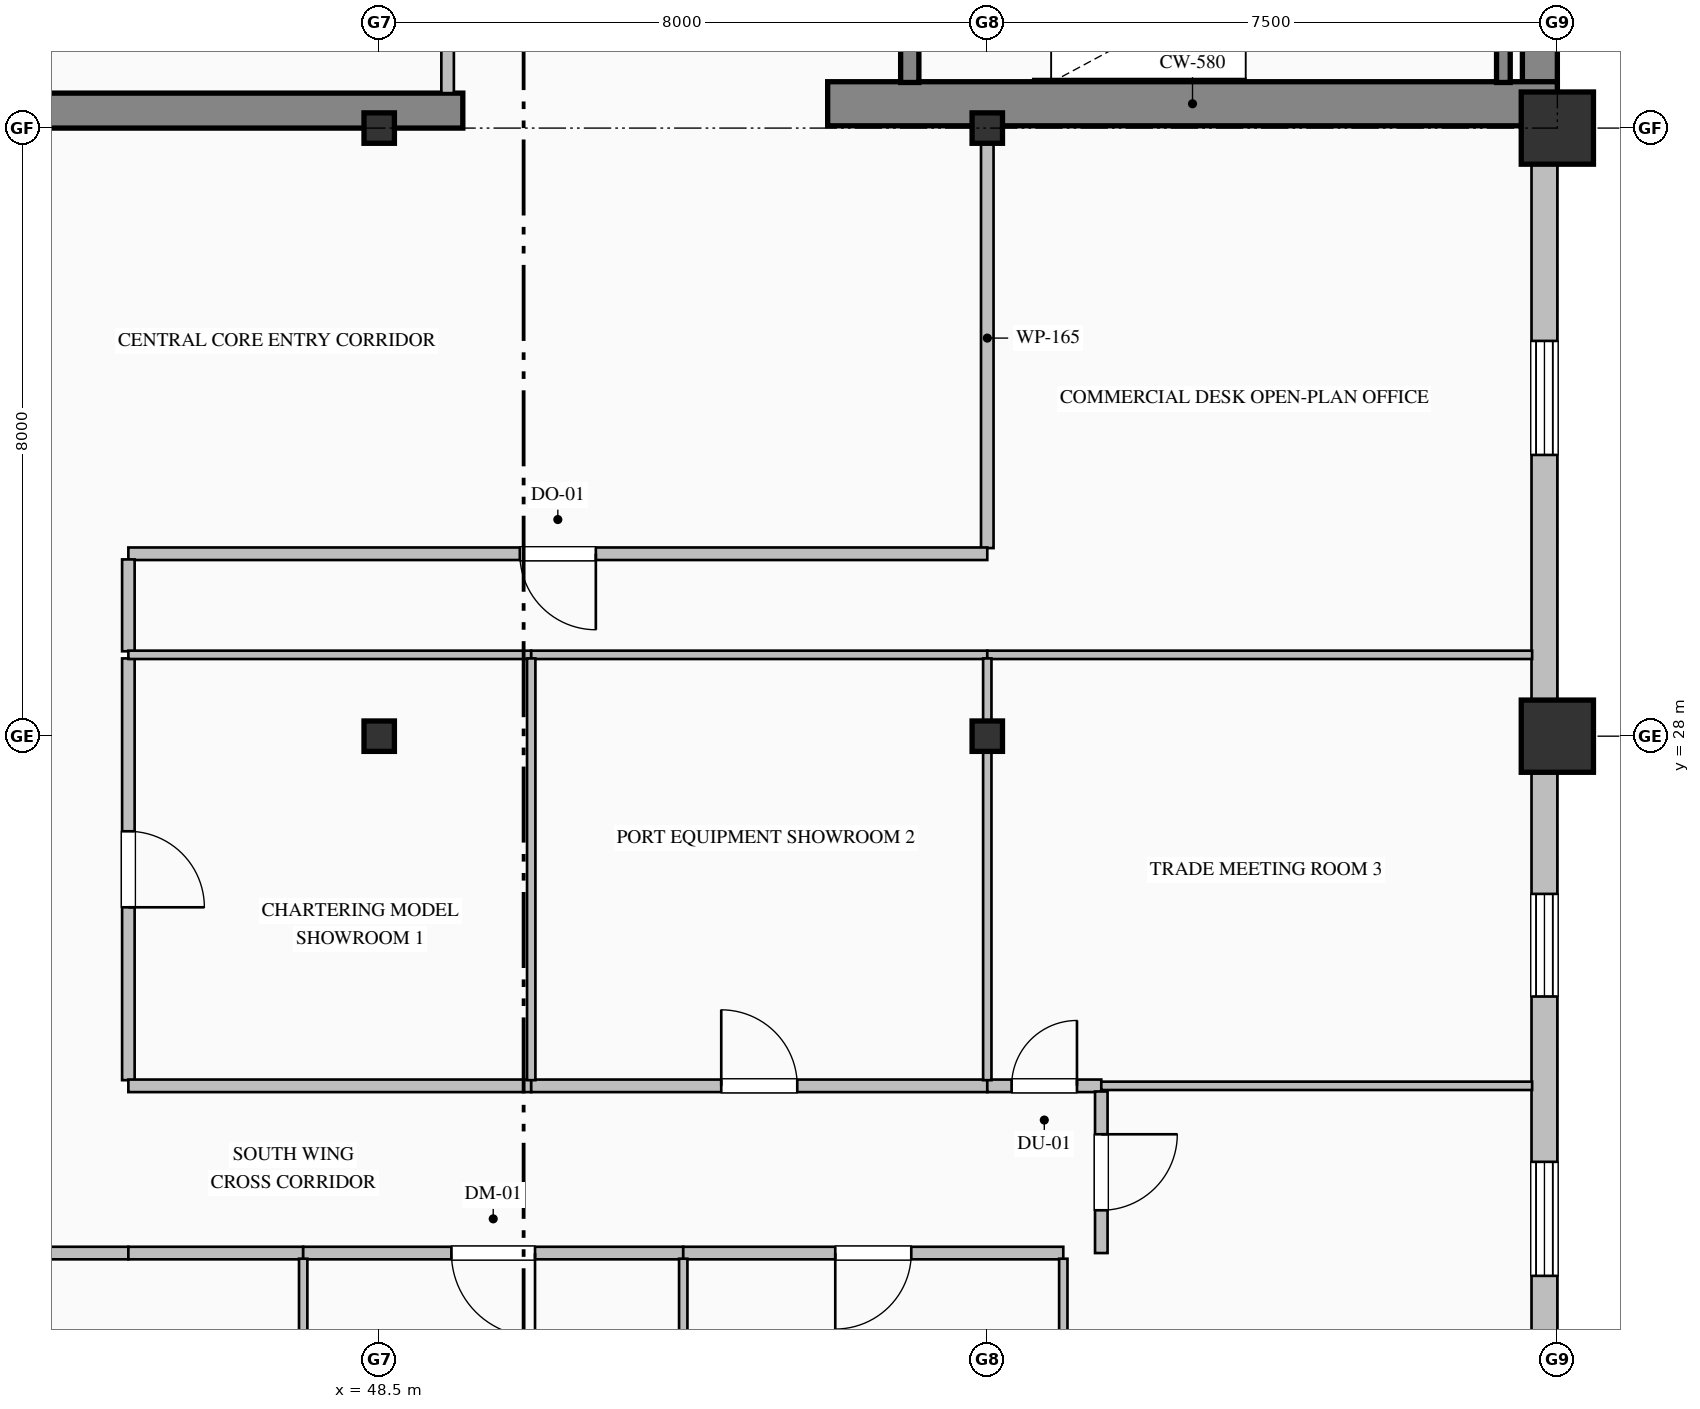
"""IFC4 building model, lengths in metres.
Left out: names, types, materials, properties, quantities, classifications, styles, units other than length and angle.
Written with IfcOpenShell. Run it as: python <this file> out.ifc"""

import sys

from ifc_helpers import new_model, si_unit, direction, frame, frame_2d, origin, origin_2d, place, context, subcontext, project, spatial, rectangle, hollow_rectangle, i_section, extrude, element, fill, save


model = new_model("IFC4")
c1 = context("Model", 3, precision=1e-05, world=origin(), true_north=direction((0.0, 1.0)))
c2 = subcontext(c1, "Body", "Model", "MODEL_VIEW")
j1 = project(units=[si_unit("LENGTHUNIT", "METRE"), si_unit("PLANEANGLEUNIT", "RADIAN")], contexts=[c1])
p1 = place(None, origin())
s1 = spatial("IfcSite", under=j1, at=p1, CompositionType="ELEMENT")
p2 = place(p1, origin())
s2 = spatial("IfcBuilding", under=s1, at=p2, CompositionType="ELEMENT")
p3 = place(p2, frame((0.0, 0.0, 269.8)))
s3 = spatial("IfcBuildingStorey", under=s2, at=p3, CompositionType="ELEMENT", Elevation=269.8)
p4 = place(p3, frame((63.77, 36.32, 0.0), z_axis=(0.0, 0.0, 1.0), x_axis=(0.0, 1.0, 0.0)))
e1 = element("IfcWall", 1, at=p4, inside=s3, PredefinedType="SHEAR", context=c2, shape_type="SweptSolid", body=[
    extrude(rectangle(XDim=15.22, YDim=0.46, at=frame_2d((7.61, 0.0))), origin(), (0.0, 0.0, 1.0), 3.775),
])
p5 = place(p3, frame((40.5, 36.23, 0.0), z_axis=(0.0, 0.0, 1.0), x_axis=(1.0, 0.0, 0.0)))
e2 = element("IfcWall", 2, at=p5, inside=s3, PredefinedType="SHEAR", context=c2, shape_type="SweptSolid", body=[
    extrude(rectangle(XDim=9.1, YDim=0.46, at=frame_2d((4.55, 0.0))), origin(), (0.0, 0.0, 1.0), 3.775),
])
p6 = place(p3, frame((54.4, 36.32, 0.0), z_axis=(0.0, 0.0, 1.0), x_axis=(1.0, 0.0, 0.0)))
e3 = element("IfcWall", 3, at=p6, inside=s3, PredefinedType="SHEAR", context=c2, shape_type="SweptSolid", body=[
    extrude(rectangle(XDim=9.6, YDim=0.58, at=frame_2d((4.8, 0.0))), origin(), (0.0, 0.0, 1.0), 4.0),
])
for number, where, z_axis, x_axis in (
    (4, (48.5, 28.0, 0.0), (0.0, 0.0, 1.0), (1.0, 0.0, 0.0)),
    (5, (48.5, 36.0, 0.0), (0.0, 0.0, 1.0), (1.0, 0.0, 0.0)),
    (6, (56.5, 28.0, 0.0), (0.0, 0.0, 1.0), (1.0, 0.0, 0.0)),
    (7, (56.5, 36.0, 0.0), (0.0, 0.0, 1.0), (1.0, 0.0, 0.0)),
):
    element("IfcColumn", number, at=place(p3, frame(where, z_axis=z_axis, x_axis=x_axis)), inside=s3, PredefinedType="COLUMN", context=c2, shape_type="SweptSolid", body=[
        extrude(i_section(OverallWidth=0.4, OverallDepth=0.4, WebThickness=0.013, FlangeThickness=0.021, FilletRadius=0.022, at=origin_2d()), origin(), (0.0, 0.0, 1.0), 4.0),
    ])
for number, where, z_axis, x_axis in (
    (8, (64.0, 28.0, 0.0), (0.0, 0.0, 1.0), (1.0, 0.0, 0.0)),
    (9, (64.0, 36.0, 0.0), (0.0, 0.0, 1.0), (1.0, 0.0, 0.0)),
):
    element("IfcColumn", number, at=place(p3, frame(where, z_axis=z_axis, x_axis=x_axis)), inside=s3, PredefinedType="COLUMN", context=c2, shape_type="SweptSolid", body=[
        extrude(hollow_rectangle(XDim=0.95, YDim=0.95, WallThickness=0.036, at=origin_2d()), origin(), (0.0, 0.0, 1.0), 4.0),
    ])
p7 = place(p3, frame((63.83, 36.05, 0.0), z_axis=(0.0, 0.0, 1.0), x_axis=(0.0, -1.0, 0.0)))
e10 = element("IfcWall", 10, at=p7, inside=s3, PredefinedType="SOLIDWALL", context=c2, shape_type="SweptSolid", body=[
    extrude(rectangle(XDim=19.55, YDim=0.34, at=frame_2d((9.775, 0.0))), origin(), (0.0, 0.0, 1.0), 3.325),
])
p8 = place(p7, frame((2.85, 0.0, 0.7)))
e11 = element("IfcOpeningElement", 11, at=p8, cuts=e10, PredefinedType="OPENING", context=c2, shape_type="SweptSolid", body=[
    extrude(rectangle(XDim=1.5, YDim=2.4, at=frame_2d((0.75, 1.2))), frame((0.0, 0.18, 0.0), z_axis=(0.0, -1.0, 0.0), x_axis=(1.0, 0.0, 0.0)), (0.0, 0.0, 1.0), 0.36),
])
p9 = place(p7, frame((10.125, 0.0, 0.9)))
e12 = element("IfcOpeningElement", 12, at=p9, cuts=e10, PredefinedType="OPENING", context=c2, shape_type="SweptSolid", body=[
    extrude(rectangle(XDim=1.35, YDim=1.85, at=frame_2d((0.675, 0.925))), frame((0.0, 0.18, 0.0), z_axis=(0.0, -1.0, 0.0), x_axis=(1.0, 0.0, 0.0)), (0.0, 0.0, 1.0), 0.36),
])
p10 = place(p7, frame((13.65, 0.0, 0.7)))
e13 = element("IfcOpeningElement", 13, at=p10, cuts=e10, PredefinedType="OPENING", context=c2, shape_type="SweptSolid", body=[
    extrude(rectangle(XDim=1.5, YDim=2.4, at=frame_2d((0.75, 1.2))), frame((0.0, 0.18, 0.0), z_axis=(0.0, -1.0, 0.0), x_axis=(1.0, 0.0, 0.0)), (0.0, 0.0, 1.0), 0.36),
])
p11 = place(p3, frame((55.48, 39.75, 0.0), z_axis=(0.0, 0.0, 1.0), x_axis=(0.0, -1.0, 0.0)))
e14 = element("IfcWall", 14, at=p11, inside=s3, PredefinedType="SOLIDWALL", context=c2, shape_type="SweptSolid", body=[
    extrude(rectangle(XDim=3.15, YDim=0.24, at=frame_2d((1.575, 0.0))), origin(), (0.0, 0.0, 1.0), 4.0),
])
p12 = place(p11, frame((1.0, 0.0, 0.0)))
e15 = element("IfcOpeningElement", 15, at=p12, cuts=e14, PredefinedType="OPENING", context=c2, shape_type="SweptSolid", body=[
    extrude(rectangle(XDim=1.15, YDim=2.2, at=frame_2d((0.575, 1.1))), frame((0.0, 0.13, 0.0), z_axis=(0.0, -1.0, 0.0), x_axis=(1.0, 0.0, 0.0)), (0.0, 0.0, 1.0), 0.26),
])
p13 = place(p3, frame((63.29, 36.6, 0.0), z_axis=(0.0, 0.0, 1.0), x_axis=(0.0, 1.0, 0.0)))
e16 = element("IfcWall", 16, at=p13, inside=s3, PredefinedType="SOLIDWALL", context=c2, shape_type="SweptSolid", body=[
    extrude(rectangle(XDim=3.15, YDim=0.18, at=frame_2d((1.575, 0.0))), origin(), (0.0, 0.0, 1.0), 4.0),
])
p14 = place(p3, frame((49.4, 36.46, 0.0), z_axis=(0.0, 0.0, 1.0), x_axis=(0.0, 1.0, 0.0)))
e17 = element("IfcWall", 17, at=p14, inside=s3, PredefinedType="PARTITIONING", context=c2, shape_type="SweptSolid", body=[
    extrude(rectangle(XDim=3.093, YDim=0.165, at=frame_2d((1.546, 0.0))), origin(), (0.0, 0.0, 1.0), 3.017),
])
p15 = place(p14, frame((1.046, 0.0, 0.0)))
e18 = element("IfcOpeningElement", 18, at=p15, cuts=e17, PredefinedType="OPENING", context=c2, shape_type="SweptSolid", body=[
    extrude(rectangle(XDim=1.0, YDim=2.15, at=frame_2d((0.5, 1.075))), frame((0.0, 0.093, 0.0), z_axis=(0.0, -1.0, 0.0), x_axis=(1.0, 0.0, 0.0)), (0.0, 0.0, 1.0), 0.185),
])
p16 = place(p3, frame((56.5, 36.0, 0.0), z_axis=(0.0, 0.0, 1.0), x_axis=(0.0, -1.0, 0.0)))
e19 = element("IfcWall", 19, at=p16, inside=s3, PredefinedType="PARTITIONING", context=c2, shape_type="SweptSolid", body=[
    extrude(rectangle(XDim=5.525, YDim=0.165, at=frame_2d((2.763, 0.0))), origin(), (0.0, 0.0, 1.0), 3.179),
])
p17 = place(p3, frame((56.5, 30.4, 0.0), z_axis=(0.0, 0.0, 1.0), x_axis=(-1.0, 0.0, 0.0)))
e20 = element("IfcWall", 20, at=p17, inside=s3, PredefinedType="PARTITIONING", context=c2, shape_type="SweptSolid", body=[
    extrude(rectangle(XDim=11.3, YDim=0.165, at=frame_2d((5.65, 0.0))), origin(), (0.0, 0.0, 1.0), 3.775),
])
p18 = place(p17, frame((5.15, 0.0, 0.0)))
e21 = element("IfcOpeningElement", 21, at=p18, cuts=e20, PredefinedType="OPENING", context=c2, shape_type="SweptSolid", body=[
    extrude(rectangle(XDim=1.0, YDim=2.15, at=frame_2d((0.5, 1.075))), frame((0.0, 0.093, 0.0), z_axis=(0.0, -1.0, 0.0), x_axis=(1.0, 0.0, 0.0)), (0.0, 0.0, 1.0), 0.185),
])
p19 = place(p3, frame((45.2, 30.325, 0.0), z_axis=(0.0, 0.0, 1.0), x_axis=(0.0, -1.0, 0.0)))
e22 = element("IfcWall", 22, at=p19, inside=s3, PredefinedType="PARTITIONING", context=c2, shape_type="SweptSolid", body=[
    extrude(rectangle(XDim=1.208, YDim=0.165, at=frame_2d((0.604, 0.0))), origin(), (0.0, 0.0, 1.0), 3.775),
])
p20 = place(p3, frame((45.2, 29.023, 0.0), z_axis=(0.0, 0.0, 1.0), x_axis=(0.0, -1.0, 0.0)))
e23 = element("IfcWall", 23, at=p20, inside=s3, PredefinedType="PARTITIONING", context=c2, shape_type="SweptSolid", body=[
    extrude(rectangle(XDim=5.548, YDim=0.165, at=frame_2d((2.774, 0.0))), origin(), (0.0, 0.0, 1.0), 3.775),
])
p21 = place(p20, frame((2.274, 0.0, 0.0)))
e24 = element("IfcOpeningElement", 24, at=p21, cuts=e23, PredefinedType="OPENING", context=c2, shape_type="SweptSolid", body=[
    extrude(rectangle(XDim=1.0, YDim=2.15, at=frame_2d((0.5, 1.075))), frame((0.0, 0.093, 0.0), z_axis=(0.0, -1.0, 0.0), x_axis=(1.0, 0.0, 0.0)), (0.0, 0.0, 1.0), 0.185),
])
p22 = place(p3, frame((45.2, 21.2, 0.0), z_axis=(0.0, 0.0, 1.0), x_axis=(-1.0, 0.0, 0.0)))
e25 = element("IfcWall", 25, at=p22, inside=s3, PredefinedType="PARTITIONING", context=c2, shape_type="SweptSolid", body=[
    extrude(rectangle(XDim=2.2, YDim=0.165, at=frame_2d((1.1, 0.0))), origin(), (0.0, 0.0, 1.0), 3.775),
])
p23 = place(p3, frame((45.2, 23.4, 0.0), z_axis=(0.0, 0.0, 1.0), x_axis=(1.0, 0.0, 0.0)))
e26 = element("IfcWall", 26, at=p23, inside=s3, PredefinedType="PARTITIONING", context=c2, shape_type="SweptSolid", body=[
    extrude(rectangle(XDim=5.3, YDim=0.165, at=frame_2d((2.65, 0.0))), origin(), (0.0, 0.0, 1.0), 3.467),
])
p24 = place(p3, frame((50.5, 23.4, 0.0), z_axis=(0.0, 0.0, 1.0), x_axis=(1.0, 0.0, 0.0)))
e27 = element("IfcWall", 27, at=p24, inside=s3, PredefinedType="PARTITIONING", context=c2, shape_type="SweptSolid", body=[
    extrude(rectangle(XDim=6.0, YDim=0.165, at=frame_2d((3.0, 0.0))), origin(), (0.0, 0.0, 1.0), 3.467),
])
p25 = place(p24, frame((2.5, 0.0, 0.0)))
e28 = element("IfcOpeningElement", 28, at=p25, cuts=e27, PredefinedType="OPENING", context=c2, shape_type="SweptSolid", body=[
    extrude(rectangle(XDim=1.0, YDim=2.15, at=frame_2d((0.5, 1.075))), frame((0.0, 0.093, 0.0), z_axis=(0.0, -1.0, 0.0), x_axis=(1.0, 0.0, 0.0)), (0.0, 0.0, 1.0), 0.185),
])
p26 = place(p3, frame((56.5, 23.4, 0.0), z_axis=(0.0, 0.0, 1.0), x_axis=(1.0, 0.0, 0.0)))
e29 = element("IfcWall", 29, at=p26, inside=s3, PredefinedType="PARTITIONING", context=c2, shape_type="SweptSolid", body=[
    extrude(rectangle(XDim=1.5, YDim=0.165, at=frame_2d((0.75, 0.0))), origin(), (0.0, 0.0, 1.0), 3.775),
])
p27 = place(p26, frame((0.32, 0.0, 0.0)))
e30 = element("IfcOpeningElement", 30, at=p27, cuts=e29, PredefinedType="OPENING", context=c2, shape_type="SweptSolid", body=[
    extrude(rectangle(XDim=0.86, YDim=2.1, at=frame_2d((0.43, 1.05))), frame((0.0, 0.093, 0.0), z_axis=(0.0, -1.0, 0.0), x_axis=(1.0, 0.0, 0.0)), (0.0, 0.0, 1.0), 0.185),
])
p28 = place(p3, frame((47.5, 21.2, 0.0), z_axis=(0.0, 0.0, 1.0), x_axis=(-1.0, 0.0, 0.0)))
e31 = element("IfcWall", 31, at=p28, inside=s3, PredefinedType="PARTITIONING", context=c2, shape_type="SweptSolid", body=[
    extrude(rectangle(XDim=2.3, YDim=0.165, at=frame_2d((1.15, 0.0))), origin(), (0.0, 0.0, 1.0), 3.775),
])
p29 = place(p3, frame((52.5, 21.2, 0.0), z_axis=(0.0, 0.0, 1.0), x_axis=(-1.0, 0.0, 0.0)))
e32 = element("IfcWall", 32, at=p29, inside=s3, PredefinedType="PARTITIONING", context=c2, shape_type="SweptSolid", body=[
    extrude(rectangle(XDim=5.0, YDim=0.165, at=frame_2d((2.5, 0.0))), origin(), (0.0, 0.0, 1.0), 3.775),
])
p30 = place(p29, frame((1.95, 0.0, 0.0)))
e33 = element("IfcOpeningElement", 33, at=p30, cuts=e32, PredefinedType="OPENING", context=c2, shape_type="SweptSolid", body=[
    extrude(rectangle(XDim=1.1, YDim=2.2, at=frame_2d((0.55, 1.1))), frame((0.0, 0.093, 0.0), z_axis=(0.0, -1.0, 0.0), x_axis=(1.0, 0.0, 0.0)), (0.0, 0.0, 1.0), 0.185),
])
p31 = place(p3, frame((57.5, 21.2, 0.0), z_axis=(0.0, 0.0, 1.0), x_axis=(-1.0, 0.0, 0.0)))
e34 = element("IfcWall", 34, at=p31, inside=s3, PredefinedType="PARTITIONING", context=c2, shape_type="SweptSolid", body=[
    extrude(rectangle(XDim=5.0, YDim=0.165, at=frame_2d((2.5, 0.0))), origin(), (0.0, 0.0, 1.0), 3.775),
])
p32 = place(p31, frame((2.0, 0.0, 0.0)))
e35 = element("IfcOpeningElement", 35, at=p32, cuts=e34, PredefinedType="OPENING", context=c2, shape_type="SweptSolid", body=[
    extrude(rectangle(XDim=1.0, YDim=2.15, at=frame_2d((0.5, 1.075))), frame((0.0, 0.093, 0.0), z_axis=(0.0, -1.0, 0.0), x_axis=(1.0, 0.0, 0.0)), (0.0, 0.0, 1.0), 0.185),
])
p33 = place(p3, frame((58.0, 23.325, 0.0), z_axis=(0.0, 0.0, 1.0), x_axis=(0.0, -1.0, 0.0)))
e36 = element("IfcWall", 36, at=p33, inside=s3, PredefinedType="PARTITIONING", context=c2, shape_type="SweptSolid", body=[
    extrude(rectangle(XDim=2.125, YDim=0.165, at=frame_2d((1.063, 0.0))), origin(), (0.0, 0.0, 1.0), 3.775),
])
p34 = place(p33, frame((0.563, 0.0, 0.0)))
e37 = element("IfcOpeningElement", 37, at=p34, cuts=e36, PredefinedType="OPENING", context=c2, shape_type="SweptSolid", body=[
    extrude(rectangle(XDim=1.0, YDim=2.15, at=frame_2d((0.5, 1.075))), frame((0.0, 0.093, 0.0), z_axis=(0.0, -1.0, 0.0), x_axis=(1.0, 0.0, 0.0)), (0.0, 0.0, 1.0), 0.185),
])
p35 = place(p3, frame((50.5, 29.07, 0.0), z_axis=(0.0, 0.0, 1.0), x_axis=(-1.0, 0.0, 0.0)))
e38 = element("IfcWall", 38, at=p35, inside=s3, PredefinedType="MOVABLE", context=c2, shape_type="SweptSolid", body=[
    extrude(rectangle(XDim=5.3, YDim=0.11, at=frame_2d((2.65, 0.0))), origin(), (0.0, 0.0, 1.0), 3.775),
])
p36 = place(p3, frame((56.5, 29.07, 0.0), z_axis=(0.0, 0.0, 1.0), x_axis=(-1.0, 0.0, 0.0)))
e39 = element("IfcWall", 39, at=p36, inside=s3, PredefinedType="MOVABLE", context=c2, shape_type="SweptSolid", body=[
    extrude(rectangle(XDim=6.0, YDim=0.11, at=frame_2d((3.0, 0.0))), origin(), (0.0, 0.0, 1.0), 3.775),
])
p37 = place(p3, frame((63.668, 29.07, 0.0), z_axis=(0.0, 0.0, 1.0), x_axis=(-1.0, 0.0, 0.0)))
e40 = element("IfcWall", 40, at=p37, inside=s3, PredefinedType="MOVABLE", context=c2, shape_type="SweptSolid", body=[
    extrude(rectangle(XDim=7.168, YDim=0.11, at=frame_2d((3.584, 0.0))), origin(), (0.0, 0.0, 1.0), 3.775),
])
p38 = place(p3, frame((50.5, 29.023, 0.0), z_axis=(0.0, 0.0, 1.0), x_axis=(0.0, -1.0, 0.0)))
e41 = element("IfcWall", 41, at=p38, inside=s3, PredefinedType="MOVABLE", context=c2, shape_type="SweptSolid", body=[
    extrude(rectangle(XDim=5.548, YDim=0.11, at=frame_2d((2.774, 0.0))), origin(), (0.0, 0.0, 1.0), 3.775),
])
p39 = place(p3, frame((56.5, 29.023, 0.0), z_axis=(0.0, 0.0, 1.0), x_axis=(0.0, -1.0, 0.0)))
e42 = element("IfcWall", 42, at=p39, inside=s3, PredefinedType="MOVABLE", context=c2, shape_type="SweptSolid", body=[
    extrude(rectangle(XDim=5.548, YDim=0.11, at=frame_2d((2.774, 0.0))), origin(), (0.0, 0.0, 1.0), 2.967),
])
p40 = place(p3, frame((63.668, 23.4, 0.0), z_axis=(0.0, 0.0, 1.0), x_axis=(-1.0, 0.0, 0.0)))
e43 = element("IfcWall", 43, at=p40, inside=s3, PredefinedType="MOVABLE", context=c2, shape_type="SweptSolid", body=[
    extrude(rectangle(XDim=5.668, YDim=0.11, at=frame_2d((2.834, 0.0))), origin(), (0.0, 0.0, 1.0), 3.775),
])
for number, where, z_axis, x_axis in (
    (44, (47.5, 21.125, 0.0), (0.0, 0.0, 1.0), (0.0, -1.0, 0.0)),
    (45, (52.5, 21.125, 0.0), (0.0, 0.0, 1.0), (0.0, -1.0, 0.0)),
    (46, (57.5, 21.125, 0.0), (0.0, 0.0, 1.0), (0.0, -1.0, 0.0)),
):
    element("IfcWall", number, at=place(p3, frame(where, z_axis=z_axis, x_axis=x_axis)), inside=s3, PredefinedType="MOVABLE", context=c2, shape_type="SweptSolid", body=[
        extrude(rectangle(XDim=8.293, YDim=0.11, at=frame_2d((4.147, 0.0))), origin(), (0.0, 0.0, 1.0), 3.775),
    ])
p41 = place(p8, origin())
e47 = element("IfcWindow", 47, at=p41, inside=s3, PartitioningType="DOUBLE_PANEL_HORIZONTAL", PredefinedType="WINDOW", context=c2, shape_type="SweptSolid", body=[
    extrude(rectangle(XDim=1.5, YDim=2.4, at=frame_2d((0.75, 1.2))), frame((0.0, 0.15, 0.0), z_axis=(0.0, -1.0, 0.0), x_axis=(1.0, 0.0, 0.0)), (0.0, 0.0, 1.0), 0.06),
])
fill(e11, e47)
p42 = place(p9, origin())
e48 = element("IfcWindow", 48, at=p42, inside=s3, PartitioningType="DOUBLE_PANEL_VERTICAL", PredefinedType="WINDOW", context=c2, shape_type="SweptSolid", body=[
    extrude(rectangle(XDim=1.35, YDim=1.85, at=frame_2d((0.675, 0.925))), frame((0.0, 0.15, 0.0), z_axis=(0.0, -1.0, 0.0), x_axis=(1.0, 0.0, 0.0)), (0.0, 0.0, 1.0), 0.06),
])
fill(e12, e48)
p43 = place(p10, origin())
e49 = element("IfcWindow", 49, at=p43, inside=s3, PartitioningType="DOUBLE_PANEL_HORIZONTAL", PredefinedType="WINDOW", context=c2, shape_type="SweptSolid", body=[
    extrude(rectangle(XDim=1.5, YDim=2.4, at=frame_2d((0.75, 1.2))), frame((0.0, 0.15, 0.0), z_axis=(0.0, -1.0, 0.0), x_axis=(1.0, 0.0, 0.0)), (0.0, 0.0, 1.0), 0.06),
])
fill(e13, e49)
p44 = place(p18, origin())
e50 = element("IfcDoor", 50, at=p44, inside=s3, OperationType="SINGLE_SWING_LEFT", PredefinedType="DOOR", context=c2, shape_type="SweptSolid", body=[
    extrude(rectangle(XDim=1.0, YDim=2.15, at=frame_2d((0.5, 1.075))), frame((0.0, 0.025, 0.0), z_axis=(0.0, -1.0, 0.0), x_axis=(1.0, 0.0, 0.0)), (0.0, 0.0, 1.0), 0.05),
])
fill(e21, e50)
p45 = place(p21, origin())
e51 = element("IfcDoor", 51, at=p45, inside=s3, OperationType="SINGLE_SWING_RIGHT", PredefinedType="DOOR", context=c2, shape_type="SweptSolid", body=[
    extrude(rectangle(XDim=1.0, YDim=2.15, at=frame_2d((0.5, 1.075))), frame((0.0, 0.025, 0.0), z_axis=(0.0, -1.0, 0.0), x_axis=(1.0, 0.0, 0.0)), (0.0, 0.0, 1.0), 0.05),
])
fill(e24, e51)
p46 = place(p25, origin())
e52 = element("IfcDoor", 52, at=p46, inside=s3, OperationType="SINGLE_SWING_LEFT", PredefinedType="DOOR", context=c2, shape_type="SweptSolid", body=[
    extrude(rectangle(XDim=1.0, YDim=2.15, at=frame_2d((0.5, 1.075))), frame((0.0, 0.025, 0.0), z_axis=(0.0, -1.0, 0.0), x_axis=(1.0, 0.0, 0.0)), (0.0, 0.0, 1.0), 0.05),
])
fill(e28, e52)
p47 = place(p27, origin())
e53 = element("IfcDoor", 53, at=p47, inside=s3, OperationType="SINGLE_SWING_RIGHT", PredefinedType="DOOR", context=c2, shape_type="SweptSolid", body=[
    extrude(rectangle(XDim=0.86, YDim=2.1, at=frame_2d((0.43, 1.05))), frame((0.0, 0.025, 0.0), z_axis=(0.0, -1.0, 0.0), x_axis=(1.0, 0.0, 0.0)), (0.0, 0.0, 1.0), 0.05),
])
fill(e30, e53)
p48 = place(p30, origin())
e54 = element("IfcDoor", 54, at=p48, inside=s3, OperationType="SINGLE_SWING_LEFT", PredefinedType="DOOR", context=c2, shape_type="SweptSolid", body=[
    extrude(rectangle(XDim=1.1, YDim=2.2, at=frame_2d((0.55, 1.1))), frame((0.0, 0.025, 0.0), z_axis=(0.0, -1.0, 0.0), x_axis=(1.0, 0.0, 0.0)), (0.0, 0.0, 1.0), 0.05),
])
fill(e33, e54)
p49 = place(p32, origin())
e55 = element("IfcDoor", 55, at=p49, inside=s3, OperationType="SINGLE_SWING_RIGHT", PredefinedType="DOOR", context=c2, shape_type="SweptSolid", body=[
    extrude(rectangle(XDim=1.0, YDim=2.15, at=frame_2d((0.5, 1.075))), frame((0.0, 0.025, 0.0), z_axis=(0.0, -1.0, 0.0), x_axis=(1.0, 0.0, 0.0)), (0.0, 0.0, 1.0), 0.05),
])
fill(e35, e55)
p50 = place(p34, origin())
e56 = element("IfcDoor", 56, at=p50, inside=s3, OperationType="SINGLE_SWING_LEFT", PredefinedType="DOOR", context=c2, shape_type="SweptSolid", body=[
    extrude(rectangle(XDim=1.0, YDim=2.15, at=frame_2d((0.5, 1.075))), frame((0.0, 0.025, 0.0), z_axis=(0.0, -1.0, 0.0), x_axis=(1.0, 0.0, 0.0)), (0.0, 0.0, 1.0), 0.05),
])
fill(e37, e56)
save(model, sys.argv[1])
